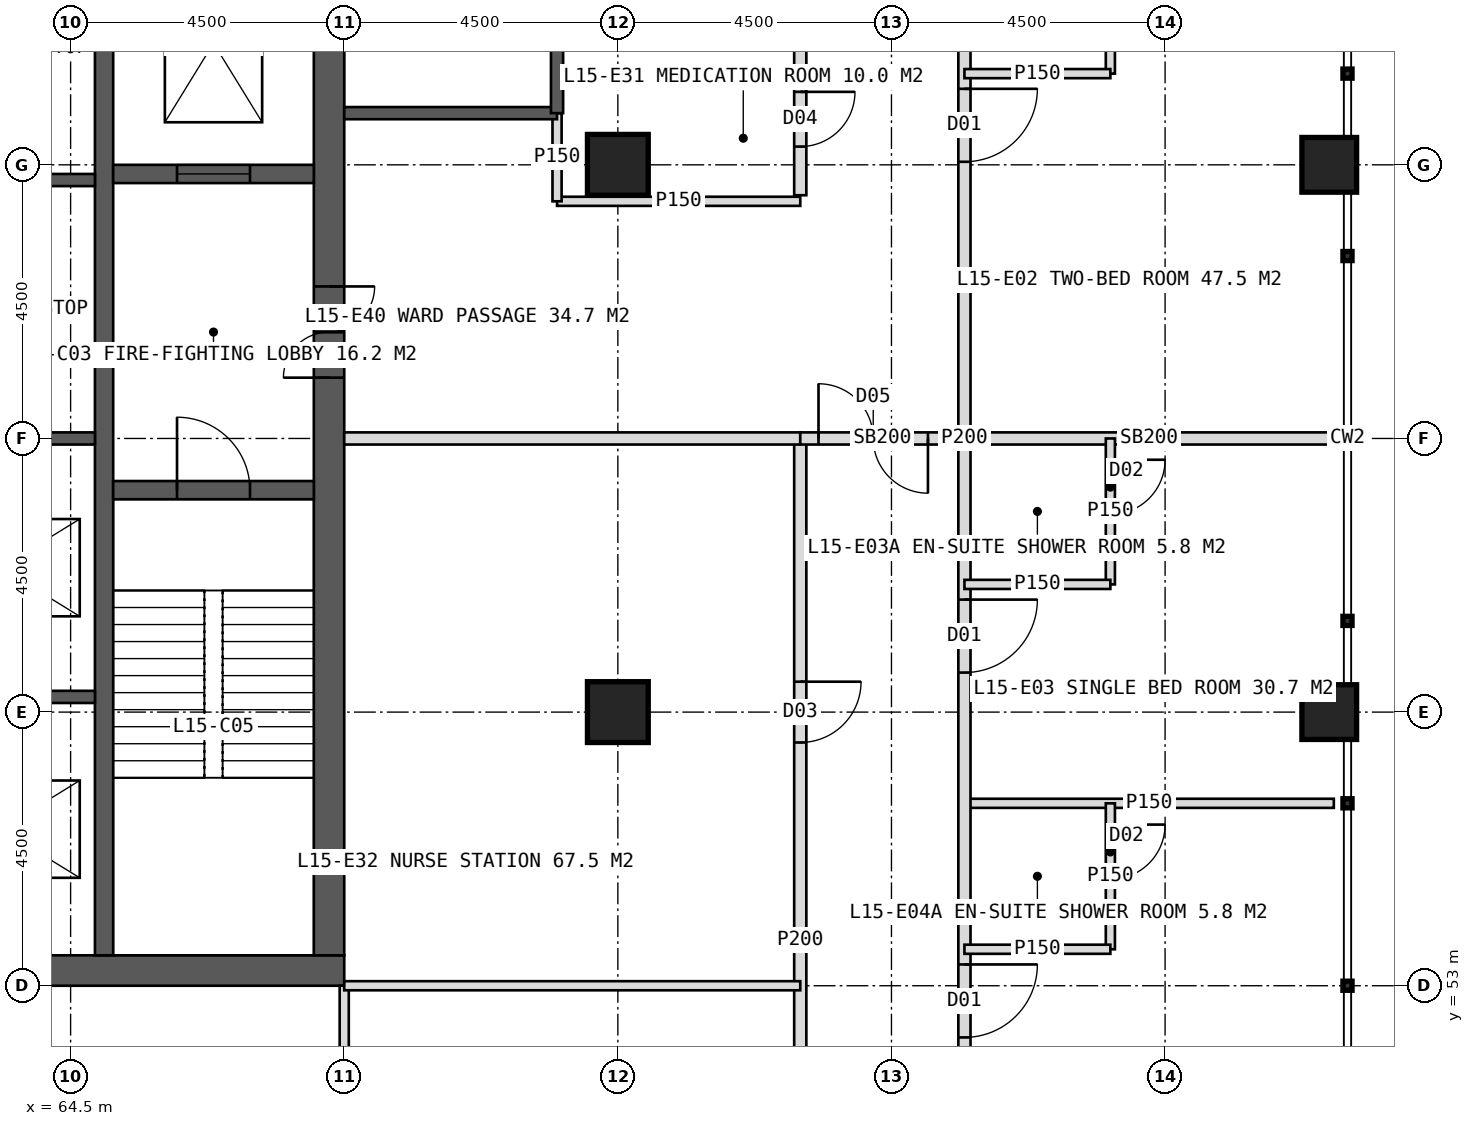
"""IFC4 building model, lengths in metres.
Left out: names, types, materials, properties, quantities, classifications, styles, units other than length and angle.
Written with IfcOpenShell. Run it as: python <this file> out.ifc"""

import sys

from ifc_helpers import new_model, si_unit, direction, frame, frame_2d, origin, origin_2d, place, context, subcontext, project, spatial, rectangle, hollow_rectangle, extrude, element, fill, save


model = new_model("IFC4")
c1 = context("Model", 3, precision=1e-05, world=origin(), true_north=direction((0.0, 1.0)))
c2 = subcontext(c1, "Body", "Model", "MODEL_VIEW")
j1 = project(units=[si_unit("LENGTHUNIT", "METRE"), si_unit("PLANEANGLEUNIT", "RADIAN")], contexts=[c1])
p1 = place(None, origin())
s1 = spatial("IfcSite", under=j1, at=p1, CompositionType="ELEMENT")
p2 = place(p1, origin())
s2 = spatial("IfcBuilding", under=s1, at=p2, CompositionType="ELEMENT")
p3 = place(p2, frame((0.0, 0.0, 67.0)))
s3 = spatial("IfcBuildingStorey", under=s2, at=p3, CompositionType="ELEMENT", Elevation=67.0)
p4 = place(p3, frame((51.0, 53.25, 0.0), z_axis=(0.0, 0.0, 1.0), x_axis=(1.0, 0.0, 0.0)))
e1 = element("IfcWall", 1, at=p4, inside=s3, PredefinedType="SHEAR", context=c2, shape_type="SweptSolid", body=[
    extrude(rectangle(XDim=18.0, YDim=0.5, at=frame_2d((9.0, 0.0))), origin(), (0.0, 0.0, 1.0), 4.0),
])
p5 = place(p4, frame((8.1, 0.0, 0.0)))
e2 = element("IfcOpeningElement", 2, at=p5, cuts=e1, PredefinedType="OPENING", context=c2, shape_type="SweptSolid", body=[
    extrude(rectangle(XDim=1.8, YDim=2.2, at=frame_2d((0.9, 1.1))), frame((0.0, 0.26, 0.0), z_axis=(0.0, -1.0, 0.0), x_axis=(1.0, 0.0, 0.0)), (0.0, 0.0, 1.0), 0.52),
])
p6 = place(p3, frame((68.75, 53.5, 0.0), z_axis=(0.0, 0.0, 1.0), x_axis=(0.0, 1.0, 0.0)))
e3 = element("IfcWall", 3, at=p6, inside=s3, PredefinedType="SHEAR", context=c2, shape_type="SweptSolid", body=[
    extrude(rectangle(XDim=17.0, YDim=0.5, at=frame_2d((8.5, 0.0))), origin(), (0.0, 0.0, 1.0), 4.0),
])
p7 = place(p6, frame((9.5, 0.0, 0.0)))
e4 = element("IfcOpeningElement", 4, at=p7, cuts=e3, PredefinedType="OPENING", context=c2, shape_type="SweptSolid", body=[
    extrude(rectangle(XDim=1.5, YDim=2.2, at=frame_2d((0.75, 1.1))), frame((0.0, 0.26, 0.0), z_axis=(0.0, -1.0, 0.0), x_axis=(1.0, 0.0, 0.0)), (0.0, 0.0, 1.0), 0.52),
])
p8 = place(p3, frame((65.05, 53.5, 0.0), z_axis=(0.0, 0.0, 1.0), x_axis=(0.0, 1.0, 0.0)))
e5 = element("IfcWall", 5, at=p8, inside=s3, PredefinedType="SHEAR", context=c2, shape_type="SweptSolid", body=[
    extrude(rectangle(XDim=17.0, YDim=0.3, at=frame_2d((8.5, 0.0))), origin(), (0.0, 0.0, 1.0), 4.0),
])
for number, where, z_axis, x_axis in (
    (6, (61.85, 57.75, 0.0), (0.0, 0.0, 1.0), (1.0, 0.0, 0.0)),
    (7, (61.85, 62.0, 0.0), (0.0, 0.0, 1.0), (1.0, 0.0, 0.0)),
    (8, (61.85, 66.25, 0.0), (0.0, 0.0, 1.0), (1.0, 0.0, 0.0)),
):
    element("IfcWall", number, at=place(p3, frame(where, z_axis=z_axis, x_axis=x_axis)), inside=s3, PredefinedType="SHEAR", context=c2, shape_type="SweptSolid", body=[
        extrude(rectangle(XDim=3.05, YDim=0.2, at=frame_2d((1.525, 0.0))), origin(), (0.0, 0.0, 1.0), 4.0),
    ])
p9 = place(p3, frame((65.2, 61.15, 0.0), z_axis=(0.0, 0.0, 1.0), x_axis=(1.0, 0.0, 0.0)))
e9 = element("IfcWall", 9, at=p9, inside=s3, PredefinedType="SHEAR", context=c2, shape_type="SweptSolid", body=[
    extrude(rectangle(XDim=3.3, YDim=0.3, at=frame_2d((1.65, 0.0))), origin(), (0.0, 0.0, 1.0), 4.0),
])
p10 = place(p9, frame((1.05, 0.0, 0.0)))
e10 = element("IfcOpeningElement", 10, at=p10, cuts=e9, PredefinedType="OPENING", context=c2, shape_type="SweptSolid", body=[
    extrude(rectangle(XDim=1.2, YDim=2.1, at=frame_2d((0.6, 1.05))), frame((0.0, 0.16, 0.0), z_axis=(0.0, -1.0, 0.0), x_axis=(1.0, 0.0, 0.0)), (0.0, 0.0, 1.0), 0.32),
])
p11 = place(p3, frame((65.2, 66.35, 0.0), z_axis=(0.0, 0.0, 1.0), x_axis=(1.0, 0.0, 0.0)))
e11 = element("IfcWall", 11, at=p11, inside=s3, PredefinedType="SHEAR", context=c2, shape_type="SweptSolid", body=[
    extrude(rectangle(XDim=3.3, YDim=0.3, at=frame_2d((1.65, 0.0))), origin(), (0.0, 0.0, 1.0), 4.0),
])
p12 = place(p11, frame((1.05, 0.0, 0.0)))
e12 = element("IfcOpeningElement", 12, at=p12, cuts=e11, PredefinedType="OPENING", context=c2, shape_type="SweptSolid", body=[
    extrude(rectangle(XDim=1.2, YDim=2.2, at=frame_2d((0.6, 1.1))), frame((0.0, 0.16, 0.0), z_axis=(0.0, -1.0, 0.0), x_axis=(1.0, 0.0, 0.0)), (0.0, 0.0, 1.0), 0.32),
])
for number, where, z_axis, x_axis in (
    (13, (73.5, 57.5, 0.0), (0.0, 0.0, 1.0), (1.0, 0.0, 0.0)),
    (14, (73.5, 66.5, 0.0), (0.0, 0.0, 1.0), (1.0, 0.0, 0.0)),
):
    element("IfcColumn", number, at=place(p3, frame(where, z_axis=z_axis, x_axis=x_axis)), inside=s3, PredefinedType="COLUMN", context=c2, shape_type="SweptSolid", body=[
        extrude(hollow_rectangle(XDim=1.0, YDim=1.0, WallThickness=0.1, at=origin_2d()), origin(), (0.0, 0.0, 1.0), 4.0),
    ])
for number, where, z_axis, x_axis in (
    (15, (85.2, 57.5, 0.0), (0.0, 0.0, 1.0), (1.0, 0.0, 0.0)),
    (16, (85.2, 66.5, 0.0), (0.0, 0.0, 1.0), (1.0, 0.0, 0.0)),
):
    element("IfcColumn", number, at=place(p3, frame(where, z_axis=z_axis, x_axis=x_axis)), inside=s3, PredefinedType="COLUMN", context=c2, shape_type="SweptSolid", body=[
        extrude(hollow_rectangle(XDim=0.9, YDim=0.9, WallThickness=0.08, at=origin_2d()), origin(), (0.0, 0.0, 1.0), 4.0),
    ])
p13 = place(p3, frame((69.0, 53.0, 0.0), z_axis=(0.0, 0.0, 1.0), x_axis=(0.0, -1.0, 0.0)))
e17 = element("IfcWall", 17, at=p13, inside=s3, PredefinedType="PARTITIONING", context=c2, shape_type="SweptSolid", body=[
    extrude(rectangle(XDim=7.5, YDim=0.15, at=frame_2d((3.75, 0.0))), origin(), (0.0, 0.0, 1.0), 3.75),
])
p14 = place(p3, frame((79.2, 62.0, 0.0), z_axis=(0.0, 0.0, 1.0), x_axis=(1.0, 0.0, 0.0)))
e18 = element("IfcWall", 18, at=p14, inside=s3, PredefinedType="SOLIDWALL", context=c2, shape_type="SweptSolid", body=[
    extrude(rectangle(XDim=6.075, YDim=0.2, at=frame_2d((3.038, 0.0))), origin(), (0.0, 0.0, 1.0), 2.75),
])
p15 = place(p3, frame((79.2, 56.0, 0.0), z_axis=(0.0, 0.0, 1.0), x_axis=(1.0, 0.0, 0.0)))
e19 = element("IfcWall", 19, at=p15, inside=s3, PredefinedType="PARTITIONING", context=c2, shape_type="SweptSolid", body=[
    extrude(rectangle(XDim=6.075, YDim=0.15, at=frame_2d((3.038, 0.0))), origin(), (0.0, 0.0, 1.0), 3.75),
])
p16 = place(p3, frame((79.2, 81.2, 0.0), z_axis=(0.0, 0.0, 1.0), x_axis=(0.0, -1.0, 0.0)))
e20 = element("IfcWall", 20, at=p16, inside=s3, PredefinedType="PARTITIONING", context=c2, shape_type="SweptSolid", body=[
    extrude(rectangle(XDim=38.4, YDim=0.2, at=frame_2d((19.2, 0.0))), origin(), (0.0, 0.0, 1.0), 3.75),
])
p17 = place(p16, frame((3.25, 0.0, 0.0)))
e21 = element("IfcOpeningElement", 21, at=p17, cuts=e20, PredefinedType="OPENING", context=c2, shape_type="SweptSolid", body=[
    extrude(rectangle(XDim=1.2, YDim=2.2, at=frame_2d((0.6, 1.1))), frame((0.0, 0.11, 0.0), z_axis=(0.0, -1.0, 0.0), x_axis=(1.0, 0.0, 0.0)), (0.0, 0.0, 1.0), 0.22),
])
p18 = place(p16, frame((13.45, 0.0, 0.0)))
e22 = element("IfcOpeningElement", 22, at=p18, cuts=e20, PredefinedType="OPENING", context=c2, shape_type="SweptSolid", body=[
    extrude(rectangle(XDim=1.2, YDim=2.2, at=frame_2d((0.6, 1.1))), frame((0.0, 0.11, 0.0), z_axis=(0.0, -1.0, 0.0), x_axis=(1.0, 0.0, 0.0)), (0.0, 0.0, 1.0), 0.22),
])
p19 = place(p16, frame((21.85, 0.0, 0.0)))
e23 = element("IfcOpeningElement", 23, at=p19, cuts=e20, PredefinedType="OPENING", context=c2, shape_type="SweptSolid", body=[
    extrude(rectangle(XDim=1.2, YDim=2.2, at=frame_2d((0.6, 1.1))), frame((0.0, 0.11, 0.0), z_axis=(0.0, -1.0, 0.0), x_axis=(1.0, 0.0, 0.0)), (0.0, 0.0, 1.0), 0.22),
])
p20 = place(p16, frame((27.85, 0.0, 0.0)))
e24 = element("IfcOpeningElement", 24, at=p20, cuts=e20, PredefinedType="OPENING", context=c2, shape_type="SweptSolid", body=[
    extrude(rectangle(XDim=1.2, YDim=2.2, at=frame_2d((0.6, 1.1))), frame((0.0, 0.11, 0.0), z_axis=(0.0, -1.0, 0.0), x_axis=(1.0, 0.0, 0.0)), (0.0, 0.0, 1.0), 0.22),
])
p21 = place(p3, frame((81.6, 71.0, 0.0), z_axis=(0.0, 0.0, 1.0), x_axis=(0.0, -1.0, 0.0)))
e25 = element("IfcWall", 25, at=p21, inside=s3, PredefinedType="PARTITIONING", context=c2, shape_type="SweptSolid", body=[
    extrude(rectangle(XDim=3.0, YDim=0.15, at=frame_2d((1.5, 0.0))), origin(), (0.0, 0.0, 1.0), 3.75),
])
p22 = place(p21, frame((0.35, 0.0, 0.0)))
e26 = element("IfcOpeningElement", 26, at=p22, cuts=e25, PredefinedType="OPENING", context=c2, shape_type="SweptSolid", body=[
    extrude(rectangle(XDim=0.9, YDim=2.1, at=frame_2d((0.45, 1.05))), frame((0.0, 0.085, 0.0), z_axis=(0.0, -1.0, 0.0), x_axis=(1.0, 0.0, 0.0)), (0.0, 0.0, 1.0), 0.17),
])
p23 = place(p3, frame((79.2, 68.0, 0.0), z_axis=(0.0, 0.0, 1.0), x_axis=(1.0, 0.0, 0.0)))
e27 = element("IfcWall", 27, at=p23, inside=s3, PredefinedType="PARTITIONING", context=c2, shape_type="SweptSolid", body=[
    extrude(rectangle(XDim=2.4, YDim=0.15, at=frame_2d((1.2, 0.0))), origin(), (0.0, 0.0, 1.0), 3.75),
])
p24 = place(p3, frame((81.6, 62.0, 0.0), z_axis=(0.0, 0.0, 1.0), x_axis=(0.0, -1.0, 0.0)))
e28 = element("IfcWall", 28, at=p24, inside=s3, PredefinedType="PARTITIONING", context=c2, shape_type="SweptSolid", body=[
    extrude(rectangle(XDim=2.4, YDim=0.15, at=frame_2d((1.2, 0.0))), origin(), (0.0, 0.0, 1.0), 3.75),
])
p25 = place(p24, frame((0.35, 0.0, 0.0)))
e29 = element("IfcOpeningElement", 29, at=p25, cuts=e28, PredefinedType="OPENING", context=c2, shape_type="SweptSolid", body=[
    extrude(rectangle(XDim=0.9, YDim=2.1, at=frame_2d((0.45, 1.05))), frame((0.0, 0.085, 0.0), z_axis=(0.0, -1.0, 0.0), x_axis=(1.0, 0.0, 0.0)), (0.0, 0.0, 1.0), 0.17),
])
p26 = place(p3, frame((79.2, 59.6, 0.0), z_axis=(0.0, 0.0, 1.0), x_axis=(1.0, 0.0, 0.0)))
e30 = element("IfcWall", 30, at=p26, inside=s3, PredefinedType="PARTITIONING", context=c2, shape_type="SweptSolid", body=[
    extrude(rectangle(XDim=2.4, YDim=0.15, at=frame_2d((1.2, 0.0))), origin(), (0.0, 0.0, 1.0), 3.75),
])
p27 = place(p3, frame((81.6, 56.0, 0.0), z_axis=(0.0, 0.0, 1.0), x_axis=(0.0, -1.0, 0.0)))
e31 = element("IfcWall", 31, at=p27, inside=s3, PredefinedType="PARTITIONING", context=c2, shape_type="SweptSolid", body=[
    extrude(rectangle(XDim=2.4, YDim=0.15, at=frame_2d((1.2, 0.0))), origin(), (0.0, 0.0, 1.0), 3.75),
])
p28 = place(p27, frame((0.35, 0.0, 0.0)))
e32 = element("IfcOpeningElement", 32, at=p28, cuts=e31, PredefinedType="OPENING", context=c2, shape_type="SweptSolid", body=[
    extrude(rectangle(XDim=0.9, YDim=2.1, at=frame_2d((0.45, 1.05))), frame((0.0, 0.085, 0.0), z_axis=(0.0, -1.0, 0.0), x_axis=(1.0, 0.0, 0.0)), (0.0, 0.0, 1.0), 0.17),
])
p29 = place(p3, frame((79.2, 53.6, 0.0), z_axis=(0.0, 0.0, 1.0), x_axis=(1.0, 0.0, 0.0)))
e33 = element("IfcWall", 33, at=p29, inside=s3, PredefinedType="PARTITIONING", context=c2, shape_type="SweptSolid", body=[
    extrude(rectangle(XDim=2.4, YDim=0.15, at=frame_2d((1.2, 0.0))), origin(), (0.0, 0.0, 1.0), 3.75),
])
p30 = place(p3, frame((76.5, 78.5, 0.0), z_axis=(0.0, 0.0, 1.0), x_axis=(0.0, -1.0, 0.0)))
e34 = element("IfcWall", 34, at=p30, inside=s3, PredefinedType="PARTITIONING", context=c2, shape_type="SweptSolid", body=[
    extrude(rectangle(XDim=12.5, YDim=0.2, at=frame_2d((6.25, 0.0))), origin(), (0.0, 0.0, 1.0), 3.75),
])
p31 = place(p30, frame((8.3, 0.0, 0.0)))
e35 = element("IfcOpeningElement", 35, at=p31, cuts=e34, PredefinedType="OPENING", context=c2, shape_type="SweptSolid", body=[
    extrude(rectangle(XDim=0.9, YDim=2.1, at=frame_2d((0.45, 1.05))), frame((0.0, 0.11, 0.0), z_axis=(0.0, -1.0, 0.0), x_axis=(1.0, 0.0, 0.0)), (0.0, 0.0, 1.0), 0.22),
])
p32 = place(p30, frame((10.8, 0.0, 0.0)))
e36 = element("IfcOpeningElement", 36, at=p32, cuts=e34, PredefinedType="OPENING", context=c2, shape_type="SweptSolid", body=[
    extrude(rectangle(XDim=0.9, YDim=2.1, at=frame_2d((0.45, 1.05))), frame((0.0, 0.11, 0.0), z_axis=(0.0, -1.0, 0.0), x_axis=(1.0, 0.0, 0.0)), (0.0, 0.0, 1.0), 0.22),
])
p33 = place(p3, frame((76.5, 62.0, 0.0), z_axis=(0.0, 0.0, 1.0), x_axis=(0.0, -1.0, 0.0)))
e37 = element("IfcWall", 37, at=p33, inside=s3, PredefinedType="PARTITIONING", context=c2, shape_type="SweptSolid", body=[
    extrude(rectangle(XDim=16.5, YDim=0.2, at=frame_2d((8.25, 0.0))), origin(), (0.0, 0.0, 1.0), 3.75),
])
p34 = place(p33, frame((4.0, 0.0, 0.0)))
e38 = element("IfcOpeningElement", 38, at=p34, cuts=e37, PredefinedType="OPENING", context=c2, shape_type="SweptSolid", body=[
    extrude(rectangle(XDim=1.0, YDim=2.1, at=frame_2d((0.5, 1.05))), frame((0.0, 0.11, 0.0), z_axis=(0.0, -1.0, 0.0), x_axis=(1.0, 0.0, 0.0)), (0.0, 0.0, 1.0), 0.22),
])
p35 = place(p33, frame((12.25, 0.0, 0.0)))
e39 = element("IfcOpeningElement", 39, at=p35, cuts=e37, PredefinedType="OPENING", context=c2, shape_type="SweptSolid", body=[
    extrude(rectangle(XDim=1.0, YDim=2.1, at=frame_2d((0.5, 1.05))), frame((0.0, 0.11, 0.0), z_axis=(0.0, -1.0, 0.0), x_axis=(1.0, 0.0, 0.0)), (0.0, 0.0, 1.0), 0.22),
])
p36 = place(p3, frame((72.5, 65.9, 0.0), z_axis=(0.0, 0.0, 1.0), x_axis=(1.0, 0.0, 0.0)))
e40 = element("IfcWall", 40, at=p36, inside=s3, PredefinedType="PARTITIONING", context=c2, shape_type="SweptSolid", body=[
    extrude(rectangle(XDim=4.0, YDim=0.15, at=frame_2d((2.0, 0.0))), origin(), (0.0, 0.0, 1.0), 3.75),
])
p37 = place(p3, frame((69.0, 62.0, 0.0), z_axis=(0.0, 0.0, 1.0), x_axis=(1.0, 0.0, 0.0)))
e41 = element("IfcWall", 41, at=p37, inside=s3, PredefinedType="SOLIDWALL", context=c2, shape_type="SweptSolid", body=[
    extrude(rectangle(XDim=7.5, YDim=0.2, at=frame_2d((3.75, 0.0))), origin(), (0.0, 0.0, 1.0), 2.75),
])
p38 = place(p3, frame((69.0, 53.0, 0.0), z_axis=(0.0, 0.0, 1.0), x_axis=(1.0, 0.0, 0.0)))
e42 = element("IfcWall", 42, at=p38, inside=s3, PredefinedType="PARTITIONING", context=c2, shape_type="SweptSolid", body=[
    extrude(rectangle(XDim=7.5, YDim=0.15, at=frame_2d((3.75, 0.0))), origin(), (0.0, 0.0, 1.0), 3.75),
])
p39 = place(p3, frame((76.5, 62.0, 0.0), z_axis=(0.0, 0.0, 1.0), x_axis=(1.0, 0.0, 0.0)))
e43 = element("IfcWall", 43, at=p39, inside=s3, PredefinedType="SOLIDWALL", context=c2, shape_type="SweptSolid", body=[
    extrude(rectangle(XDim=2.7, YDim=0.2, at=frame_2d((1.35, 0.0))), origin(), (0.0, 0.0, 1.0), 2.75),
])
p40 = place(p39, frame((0.3, 0.0, 0.0)))
e44 = element("IfcOpeningElement", 44, at=p40, cuts=e43, PredefinedType="OPENING", context=c2, shape_type="SweptSolid", body=[
    extrude(rectangle(XDim=1.8, YDim=2.2, at=frame_2d((0.9, 1.1))), frame((0.0, 0.11, 0.0), z_axis=(0.0, -1.0, 0.0), x_axis=(1.0, 0.0, 0.0)), (0.0, 0.0, 1.0), 0.22),
])
p41 = place(p3, frame((72.5, 65.9, 0.0), z_axis=(0.0, 0.0, 1.0), x_axis=(0.0, 1.0, 0.0)))
e45 = element("IfcWall", 45, at=p41, inside=s3, PredefinedType="PARTITIONING", context=c2, shape_type="SweptSolid", body=[
    extrude(rectangle(XDim=1.45, YDim=0.15, at=frame_2d((0.725, 0.0))), origin(), (0.0, 0.0, 1.0), 3.75),
])
p42 = place(p3, frame((69.0, 67.35, 0.0), z_axis=(0.0, 0.0, 1.0), x_axis=(1.0, 0.0, 0.0)))
e46 = element("IfcWall", 46, at=p42, inside=s3, PredefinedType="SOLIDWALL", context=c2, shape_type="SweptSolid", body=[
    extrude(rectangle(XDim=3.5, YDim=0.2, at=frame_2d((1.75, 0.0))), origin(), (0.0, 0.0, 1.0), 3.75),
])
p43 = place(p3, frame((72.5, 67.35, 0.0), z_axis=(0.0, 0.0, 1.0), x_axis=(0.0, 1.0, 0.0)))
e47 = element("IfcWall", 47, at=p43, inside=s3, PredefinedType="SOLIDWALL", context=c2, shape_type="SweptSolid", body=[
    extrude(rectangle(XDim=7.75, YDim=0.2, at=frame_2d((3.875, 0.0))), origin(), (0.0, 0.0, 1.0), 3.75),
])
p44 = place(p18, origin())
e48 = element("IfcDoor", 48, at=p44, inside=s3, OperationType="SINGLE_SWING_LEFT", PredefinedType="DOOR", context=c2, shape_type="SweptSolid", body=[
    extrude(rectangle(XDim=1.2, YDim=2.2, at=frame_2d((0.6, 1.1))), frame((0.0, 0.025, 0.0), z_axis=(0.0, -1.0, 0.0), x_axis=(1.0, 0.0, 0.0)), (0.0, 0.0, 1.0), 0.05),
])
fill(e22, e48)
p45 = place(p19, origin())
e49 = element("IfcDoor", 49, at=p45, inside=s3, OperationType="SINGLE_SWING_LEFT", PredefinedType="DOOR", context=c2, shape_type="SweptSolid", body=[
    extrude(rectangle(XDim=1.2, YDim=2.2, at=frame_2d((0.6, 1.1))), frame((0.0, 0.025, 0.0), z_axis=(0.0, -1.0, 0.0), x_axis=(1.0, 0.0, 0.0)), (0.0, 0.0, 1.0), 0.05),
])
fill(e23, e49)
p46 = place(p25, origin())
e50 = element("IfcDoor", 50, at=p46, inside=s3, OperationType="SINGLE_SWING_LEFT", PredefinedType="DOOR", context=c2, shape_type="SweptSolid", body=[
    extrude(rectangle(XDim=0.9, YDim=2.1, at=frame_2d((0.45, 1.05))), frame((0.0, 0.025, 0.0), z_axis=(0.0, -1.0, 0.0), x_axis=(1.0, 0.0, 0.0)), (0.0, 0.0, 1.0), 0.05),
])
fill(e29, e50)
p47 = place(p20, origin())
e51 = element("IfcDoor", 51, at=p47, inside=s3, OperationType="SINGLE_SWING_LEFT", PredefinedType="DOOR", context=c2, shape_type="SweptSolid", body=[
    extrude(rectangle(XDim=1.2, YDim=2.2, at=frame_2d((0.6, 1.1))), frame((0.0, 0.025, 0.0), z_axis=(0.0, -1.0, 0.0), x_axis=(1.0, 0.0, 0.0)), (0.0, 0.0, 1.0), 0.05),
])
fill(e24, e51)
p48 = place(p28, origin())
e52 = element("IfcDoor", 52, at=p48, inside=s3, OperationType="SINGLE_SWING_LEFT", PredefinedType="DOOR", context=c2, shape_type="SweptSolid", body=[
    extrude(rectangle(XDim=0.9, YDim=2.1, at=frame_2d((0.45, 1.05))), frame((0.0, 0.025, 0.0), z_axis=(0.0, -1.0, 0.0), x_axis=(1.0, 0.0, 0.0)), (0.0, 0.0, 1.0), 0.05),
])
fill(e32, e52)
p49 = place(p32, origin())
e53 = element("IfcDoor", 53, at=p49, inside=s3, OperationType="SINGLE_SWING_LEFT", PredefinedType="DOOR", context=c2, shape_type="SweptSolid", body=[
    extrude(rectangle(XDim=0.9, YDim=2.1, at=frame_2d((0.45, 1.05))), frame((0.0, 0.025, 0.0), z_axis=(0.0, -1.0, 0.0), x_axis=(1.0, 0.0, 0.0)), (0.0, 0.0, 1.0), 0.05),
])
fill(e36, e53)
p50 = place(p34, origin())
e54 = element("IfcDoor", 54, at=p50, inside=s3, OperationType="SINGLE_SWING_LEFT", PredefinedType="DOOR", context=c2, shape_type="SweptSolid", body=[
    extrude(rectangle(XDim=1.0, YDim=2.1, at=frame_2d((0.5, 1.05))), frame((0.0, 0.025, 0.0), z_axis=(0.0, -1.0, 0.0), x_axis=(1.0, 0.0, 0.0)), (0.0, 0.0, 1.0), 0.05),
])
fill(e38, e54)
p51 = place(p40, origin())
e55 = element("IfcDoor", 55, at=p51, inside=s3, OperationType="DOUBLE_DOOR_DOUBLE_SWING", PredefinedType="DOOR", context=c2, shape_type="SweptSolid", body=[
    extrude(rectangle(XDim=1.8, YDim=2.2, at=frame_2d((0.9, 1.1))), frame((0.0, 0.025, 0.0), z_axis=(0.0, -1.0, 0.0), x_axis=(1.0, 0.0, 0.0)), (0.0, 0.0, 1.0), 0.05),
])
fill(e44, e55)
p52 = place(p7, origin())
e56 = element("IfcDoor", 56, at=p52, inside=s3, OperationType="DOUBLE_DOOR_SINGLE_SWING", PredefinedType="DOOR", context=c2, shape_type="SweptSolid", body=[
    extrude(rectangle(XDim=1.5, YDim=2.2, at=frame_2d((0.75, 1.1))), frame((0.0, 0.025, 0.0), z_axis=(0.0, -1.0, 0.0), x_axis=(1.0, 0.0, 0.0)), (0.0, 0.0, 1.0), 0.05),
])
fill(e4, e56)
p53 = place(p10, origin())
e57 = element("IfcDoor", 57, at=p53, inside=s3, OperationType="SINGLE_SWING_LEFT", PredefinedType="DOOR", context=c2, shape_type="SweptSolid", body=[
    extrude(rectangle(XDim=1.2, YDim=2.1, at=frame_2d((0.6, 1.05))), frame((0.0, 0.025, 0.0), z_axis=(0.0, -1.0, 0.0), x_axis=(1.0, 0.0, 0.0)), (0.0, 0.0, 1.0), 0.05),
])
fill(e10, e57)
p54 = place(p12, origin())
e58 = element("IfcDoor", 58, at=p54, inside=s3, OperationType="SLIDING_TO_LEFT", PredefinedType="DOOR", context=c2, shape_type="SweptSolid", body=[
    extrude(rectangle(XDim=1.2, YDim=2.2, at=frame_2d((0.6, 1.1))), frame((0.0, 0.025, 0.0), z_axis=(0.0, -1.0, 0.0), x_axis=(1.0, 0.0, 0.0)), (0.0, 0.0, 1.0), 0.05),
])
fill(e12, e58)
save(model, sys.argv[1])
